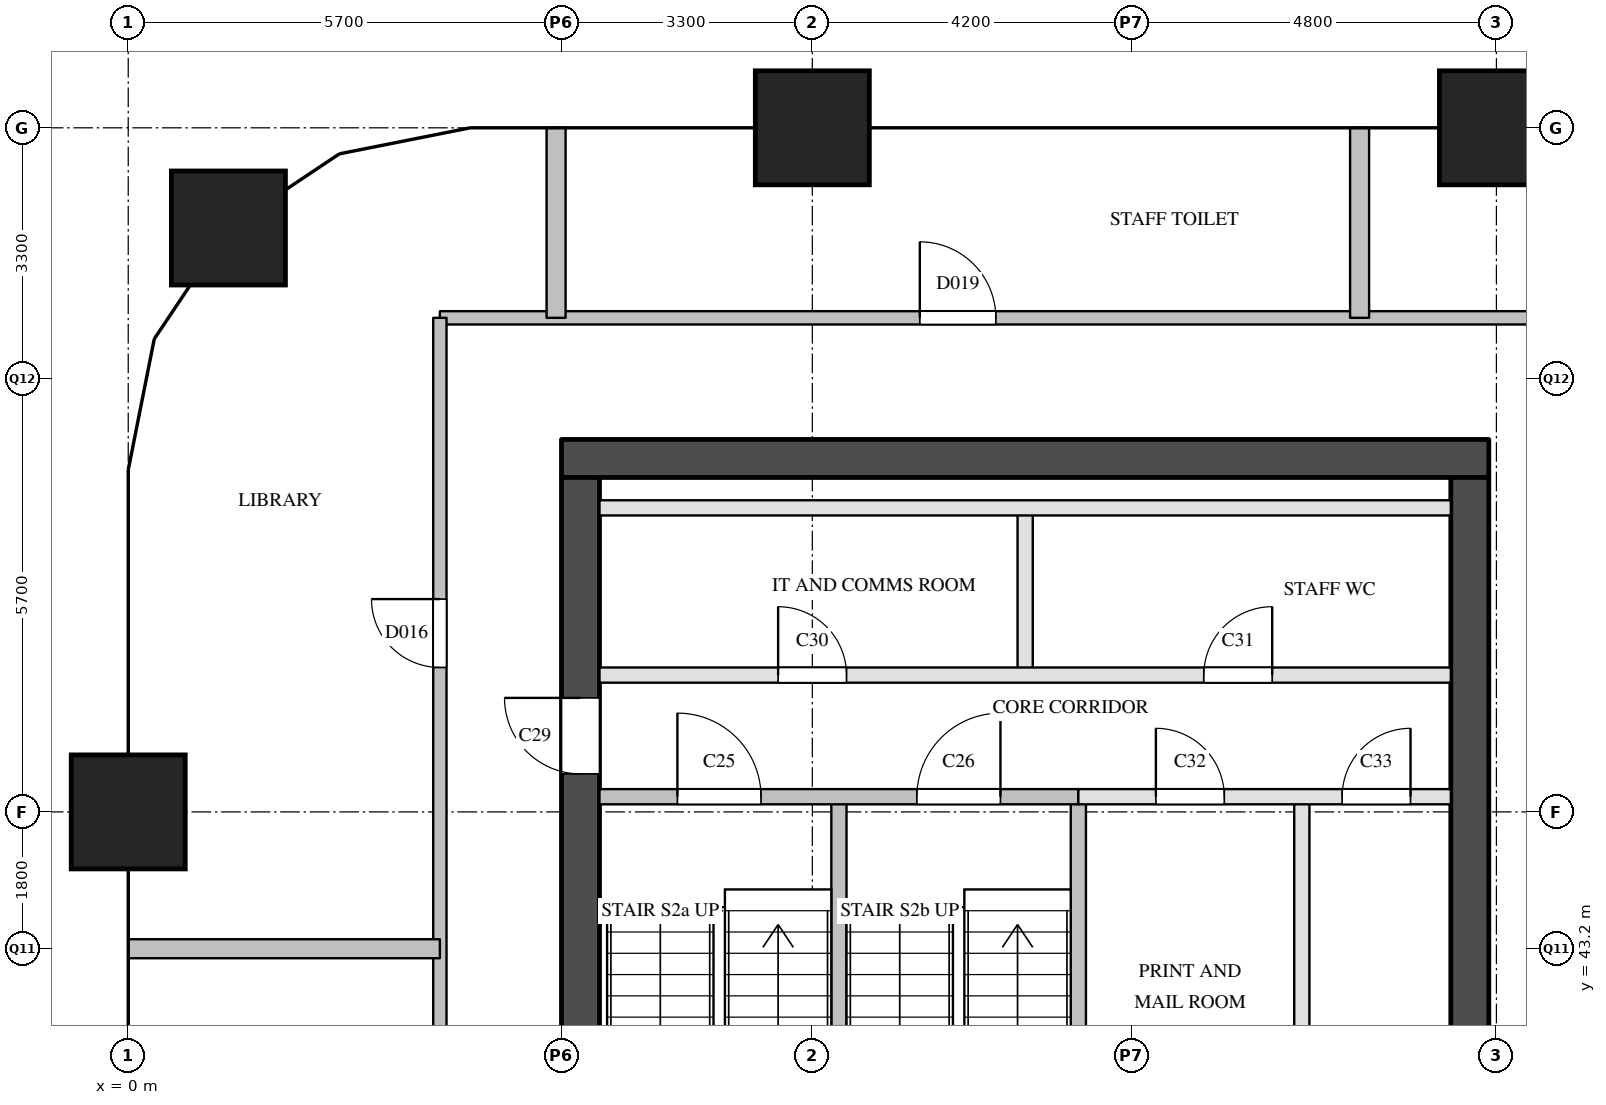
"""IFC4 building model, lengths in metres.
Left out: names, types, materials, properties, quantities, classifications, styles, units other than length and angle.
Written with IfcOpenShell. Run it as: python <this file> out.ifc"""

import sys

from ifc_helpers import new_model, si_unit, direction, frame, frame_2d, origin, origin_2d, place, context, subcontext, project, spatial, rectangle, extrude, element, fill, save


model = new_model("IFC4")
c1 = context("Model", 3, precision=1e-05, world=origin(), true_north=direction((0.0, 1.0)))
c2 = subcontext(c1, "Body", "Model", "MODEL_VIEW")
j1 = project(units=[si_unit("LENGTHUNIT", "METRE"), si_unit("PLANEANGLEUNIT", "RADIAN")], contexts=[c1])
p1 = place(None, origin())
s1 = spatial("IfcSite", under=j1, at=p1, CompositionType="ELEMENT")
p2 = place(p1, origin())
s2 = spatial("IfcBuilding", under=s1, at=p2, CompositionType="ELEMENT")
p3 = place(p2, frame((0.0, 0.0, 162.2)))
s3 = spatial("IfcBuildingStorey", under=s2, at=p3, CompositionType="ELEMENT", Elevation=162.2)
for number, where, z_axis, x_axis in (
    (1, (0.0, 45.0, 0.0), (0.0, 0.0, 1.0), (1.0, 0.0, 0.0)),
    (2, (1.318, 52.682, 0.0), (0.0, 0.0, 1.0), (1.0, 0.0, 0.0)),
    (3, (9.0, 54.0, 0.0), (0.0, 0.0, 1.0), (1.0, 0.0, 0.0)),
    (4, (18.0, 54.0, 0.0), (0.0, 0.0, 1.0), (1.0, 0.0, 0.0)),
):
    element("IfcColumn", number, at=place(p3, frame(where, z_axis=z_axis, x_axis=x_axis)), inside=s3, PredefinedType="COLUMN", context=c2, shape_type="SweptSolid", body=[
        extrude(rectangle(XDim=1.5, YDim=1.5, at=origin_2d()), origin(), (0.0, 0.0, 1.0), 3.9),
    ])
p4 = place(p3, frame((5.7, 49.65, 0.0), z_axis=(0.0, 0.0, 1.0), x_axis=(1.0, 0.0, 0.0)))
e5 = element("IfcWall", 5, at=p4, inside=s3, PredefinedType="SHEAR", context=c2, shape_type="SweptSolid", body=[
    extrude(rectangle(XDim=12.2, YDim=0.5, at=frame_2d((6.1, 0.0))), origin(), (0.0, 0.0, 1.0), 3.6),
])
p5 = place(p3, frame((5.95, 29.1, 0.0), z_axis=(0.0, 0.0, 1.0), x_axis=(0.0, 1.0, 0.0)))
e6 = element("IfcWall", 6, at=p5, inside=s3, PredefinedType="SHEAR", context=c2, shape_type="SweptSolid", body=[
    extrude(rectangle(XDim=20.3, YDim=0.5, at=frame_2d((10.15, 0.0))), origin(), (0.0, 0.0, 1.0), 3.6),
])
p6 = place(p5, frame((3.45, 0.0, 0.0)))
e7 = element("IfcOpeningElement", 7, at=p6, cuts=e6, PredefinedType="OPENING", context=c2, shape_type="SweptSolid", body=[
    extrude(rectangle(XDim=1.0, YDim=2.1, at=frame_2d((0.5, 1.05))), frame((0.0, 0.26, 0.0), z_axis=(0.0, -1.0, 0.0), x_axis=(1.0, 0.0, 0.0)), (0.0, 0.0, 1.0), 0.52),
])
p7 = place(p5, frame((16.4, 0.0, 0.0)))
e8 = element("IfcOpeningElement", 8, at=p7, cuts=e6, PredefinedType="OPENING", context=c2, shape_type="SweptSolid", body=[
    extrude(rectangle(XDim=1.0, YDim=2.1, at=frame_2d((0.5, 1.05))), frame((0.0, 0.26, 0.0), z_axis=(0.0, -1.0, 0.0), x_axis=(1.0, 0.0, 0.0)), (0.0, 0.0, 1.0), 0.52),
])
p8 = place(p3, frame((17.65, 29.1, 0.0), z_axis=(0.0, 0.0, 1.0), x_axis=(0.0, 1.0, 0.0)))
e9 = element("IfcWall", 9, at=p8, inside=s3, PredefinedType="SHEAR", context=c2, shape_type="SweptSolid", body=[
    extrude(rectangle(XDim=20.3, YDim=0.5, at=frame_2d((10.15, 0.0))), origin(), (0.0, 0.0, 1.0), 3.6),
])
p9 = place(p8, frame((1.25, 0.0, 0.0)))
e10 = element("IfcOpeningElement", 10, at=p9, cuts=e9, PredefinedType="OPENING", context=c2, shape_type="SweptSolid", body=[
    extrude(rectangle(XDim=0.7, YDim=2.1, at=frame_2d((0.35, 1.05))), frame((0.0, 0.26, 0.0), z_axis=(0.0, -1.0, 0.0), x_axis=(1.0, 0.0, 0.0)), (0.0, 0.0, 1.0), 0.52),
])
p10 = place(p8, frame((7.05, 0.0, 0.0)))
e11 = element("IfcOpeningElement", 11, at=p10, cuts=e9, PredefinedType="OPENING", context=c2, shape_type="SweptSolid", body=[
    extrude(rectangle(XDim=0.7, YDim=2.1, at=frame_2d((0.35, 1.05))), frame((0.0, 0.26, 0.0), z_axis=(0.0, -1.0, 0.0), x_axis=(1.0, 0.0, 0.0)), (0.0, 0.0, 1.0), 0.52),
])
p11 = place(p8, frame((3.6, 0.0, 0.0)))
e12 = element("IfcOpeningElement", 12, at=p11, cuts=e9, PredefinedType="OPENING", context=c2, shape_type="SweptSolid", body=[
    extrude(rectangle(XDim=1.8, YDim=2.1, at=frame_2d((0.9, 1.05))), frame((0.0, 0.26, 0.0), z_axis=(0.0, -1.0, 0.0), x_axis=(1.0, 0.0, 0.0)), (0.0, 0.0, 1.0), 0.52),
])
p12 = place(p3, frame((9.35, 40.9, 0.0), z_axis=(0.0, 0.0, 1.0), x_axis=(0.0, 1.0, 0.0)))
e13 = element("IfcWall", 13, at=p12, inside=s3, PredefinedType="SOLIDWALL", context=c2, shape_type="SweptSolid", body=[
    extrude(rectangle(XDim=4.3, YDim=0.2, at=frame_2d((2.15, 0.0))), origin(), (0.0, 0.0, 1.0), 3.6),
])
p13 = place(p3, frame((11.8, 46.8, 0.0), z_axis=(0.0, 0.0, 1.0), x_axis=(0.0, 1.0, 0.0)))
e14 = element("IfcWall", 14, at=p13, inside=s3, PredefinedType="PARTITIONING", context=c2, shape_type="SweptSolid", body=[
    extrude(rectangle(XDim=2.2, YDim=0.2, at=frame_2d((1.1, 0.0))), origin(), (0.0, 0.0, 1.0), 3.6),
])
p14 = place(p3, frame((12.5, 40.9, 0.0), z_axis=(0.0, 0.0, 1.0), x_axis=(0.0, 1.0, 0.0)))
e15 = element("IfcWall", 15, at=p14, inside=s3, PredefinedType="SOLIDWALL", context=c2, shape_type="SweptSolid", body=[
    extrude(rectangle(XDim=4.3, YDim=0.2, at=frame_2d((2.15, 0.0))), origin(), (0.0, 0.0, 1.0), 3.6),
])
p15 = place(p3, frame((15.44, 39.0, 0.0), z_axis=(0.0, 0.0, 1.0), x_axis=(0.0, 1.0, 0.0)))
e16 = element("IfcWall", 16, at=p15, inside=s3, PredefinedType="PARTITIONING", context=c2, shape_type="SweptSolid", body=[
    extrude(rectangle(XDim=6.2, YDim=0.2, at=frame_2d((3.1, 0.0))), origin(), (0.0, 0.0, 1.0), 3.6),
])
p16 = place(p3, frame((12.5, 45.2, 0.0), z_axis=(0.0, 0.0, 1.0), x_axis=(1.0, 0.0, 0.0)))
e17 = element("IfcWall", 17, at=p16, inside=s3, PredefinedType="PARTITIONING", context=c2, shape_type="SweptSolid", body=[
    extrude(rectangle(XDim=4.9, YDim=0.2, at=frame_2d((2.45, 0.0))), origin(), (0.0, 0.0, 1.0), 3.6),
])
p17 = place(p16, frame((1.02, 0.0, 0.0)))
e18 = element("IfcOpeningElement", 18, at=p17, cuts=e17, PredefinedType="OPENING", context=c2, shape_type="SweptSolid", body=[
    extrude(rectangle(XDim=0.9, YDim=2.1, at=frame_2d((0.45, 1.05))), frame((0.0, 0.11, 0.0), z_axis=(0.0, -1.0, 0.0), x_axis=(1.0, 0.0, 0.0)), (0.0, 0.0, 1.0), 0.22),
])
p18 = place(p16, frame((3.47, 0.0, 0.0)))
e19 = element("IfcOpeningElement", 19, at=p18, cuts=e17, PredefinedType="OPENING", context=c2, shape_type="SweptSolid", body=[
    extrude(rectangle(XDim=0.9, YDim=2.1, at=frame_2d((0.45, 1.05))), frame((0.0, 0.11, 0.0), z_axis=(0.0, -1.0, 0.0), x_axis=(1.0, 0.0, 0.0)), (0.0, 0.0, 1.0), 0.22),
])
p19 = place(p3, frame((6.2, 45.2, 0.0), z_axis=(0.0, 0.0, 1.0), x_axis=(1.0, 0.0, 0.0)))
e20 = element("IfcWall", 20, at=p19, inside=s3, PredefinedType="SOLIDWALL", context=c2, shape_type="SweptSolid", body=[
    extrude(rectangle(XDim=6.3, YDim=0.2, at=frame_2d((3.15, 0.0))), origin(), (0.0, 0.0, 1.0), 3.6),
])
p20 = place(p19, frame((1.025, 0.0, 0.0)))
e21 = element("IfcOpeningElement", 21, at=p20, cuts=e20, PredefinedType="OPENING", context=c2, shape_type="SweptSolid", body=[
    extrude(rectangle(XDim=1.1, YDim=2.1, at=frame_2d((0.55, 1.05))), frame((0.0, 0.11, 0.0), z_axis=(0.0, -1.0, 0.0), x_axis=(1.0, 0.0, 0.0)), (0.0, 0.0, 1.0), 0.22),
])
p21 = place(p19, frame((4.175, 0.0, 0.0)))
e22 = element("IfcOpeningElement", 22, at=p21, cuts=e20, PredefinedType="OPENING", context=c2, shape_type="SweptSolid", body=[
    extrude(rectangle(XDim=1.1, YDim=2.1, at=frame_2d((0.55, 1.05))), frame((0.0, 0.11, 0.0), z_axis=(0.0, -1.0, 0.0), x_axis=(1.0, 0.0, 0.0)), (0.0, 0.0, 1.0), 0.22),
])
p22 = place(p3, frame((6.2, 46.8, 0.0), z_axis=(0.0, 0.0, 1.0), x_axis=(1.0, 0.0, 0.0)))
e23 = element("IfcWall", 23, at=p22, inside=s3, PredefinedType="PARTITIONING", context=c2, shape_type="SweptSolid", body=[
    extrude(rectangle(XDim=11.2, YDim=0.2, at=frame_2d((5.6, 0.0))), origin(), (0.0, 0.0, 1.0), 3.6),
])
p23 = place(p22, frame((2.35, 0.0, 0.0)))
e24 = element("IfcOpeningElement", 24, at=p23, cuts=e23, PredefinedType="OPENING", context=c2, shape_type="SweptSolid", body=[
    extrude(rectangle(XDim=0.9, YDim=2.1, at=frame_2d((0.45, 1.05))), frame((0.0, 0.11, 0.0), z_axis=(0.0, -1.0, 0.0), x_axis=(1.0, 0.0, 0.0)), (0.0, 0.0, 1.0), 0.22),
])
p24 = place(p22, frame((7.95, 0.0, 0.0)))
e25 = element("IfcOpeningElement", 25, at=p24, cuts=e23, PredefinedType="OPENING", context=c2, shape_type="SweptSolid", body=[
    extrude(rectangle(XDim=0.9, YDim=2.1, at=frame_2d((0.45, 1.05))), frame((0.0, 0.11, 0.0), z_axis=(0.0, -1.0, 0.0), x_axis=(1.0, 0.0, 0.0)), (0.0, 0.0, 1.0), 0.22),
])
p25 = place(p3, frame((6.2, 49.0, 0.0), z_axis=(0.0, 0.0, 1.0), x_axis=(1.0, 0.0, 0.0)))
e26 = element("IfcWall", 26, at=p25, inside=s3, PredefinedType="PARTITIONING", context=c2, shape_type="SweptSolid", body=[
    extrude(rectangle(XDim=11.2, YDim=0.2, at=frame_2d((5.6, 0.0))), origin(), (0.0, 0.0, 1.0), 3.6),
])
p26 = place(p3, frame((4.1, 51.5, 0.0), z_axis=(0.0, 0.0, 1.0), x_axis=(1.0, 0.0, 0.0)))
e27 = element("IfcWall", 27, at=p26, inside=s3, PredefinedType="PARTITIONING", context=c2, shape_type="SweptSolid", body=[
    extrude(rectangle(XDim=15.4, YDim=0.175, at=frame_2d((7.7, 0.0))), origin(), (0.0, 0.0, 1.0), 3.6),
])
p27 = place(p26, frame((6.314, 0.0, 0.0)))
e28 = element("IfcOpeningElement", 28, at=p27, cuts=e27, PredefinedType="OPENING", context=c2, shape_type="SweptSolid", body=[
    extrude(rectangle(XDim=1.0, YDim=2.1, at=frame_2d((0.5, 1.05))), frame((0.0, 0.097, 0.0), z_axis=(0.0, -1.0, 0.0), x_axis=(1.0, 0.0, 0.0)), (0.0, 0.0, 1.0), 0.195),
])
p28 = place(p3, frame((4.1, 28.5, 0.0), z_axis=(0.0, 0.0, 1.0), x_axis=(0.0, 1.0, 0.0)))
e29 = element("IfcWall", 29, at=p28, inside=s3, PredefinedType="PARTITIONING", context=c2, shape_type="SweptSolid", body=[
    extrude(rectangle(XDim=23.0, YDim=0.175, at=frame_2d((11.5, 0.0))), origin(), (0.0, 0.0, 1.0), 3.6),
])
p29 = place(p28, frame((6.9, 0.0, 0.0)))
e30 = element("IfcOpeningElement", 30, at=p29, cuts=e29, PredefinedType="OPENING", context=c2, shape_type="SweptSolid", body=[
    extrude(rectangle(XDim=0.9, YDim=2.1, at=frame_2d((0.45, 1.05))), frame((0.0, 0.097, 0.0), z_axis=(0.0, -1.0, 0.0), x_axis=(1.0, 0.0, 0.0)), (0.0, 0.0, 1.0), 0.195),
])
p30 = place(p28, frame((18.4, 0.0, 0.0)))
e31 = element("IfcOpeningElement", 31, at=p30, cuts=e29, PredefinedType="OPENING", context=c2, shape_type="SweptSolid", body=[
    extrude(rectangle(XDim=0.9, YDim=2.1, at=frame_2d((0.45, 1.05))), frame((0.0, 0.097, 0.0), z_axis=(0.0, -1.0, 0.0), x_axis=(1.0, 0.0, 0.0)), (0.0, 0.0, 1.0), 0.195),
])
p31 = place(p3, frame((0.0, 43.2, 0.0), z_axis=(0.0, 0.0, 1.0), x_axis=(1.0, 0.0, 0.0)))
e32 = element("IfcWall", 32, at=p31, inside=s3, PredefinedType="PARTITIONING", context=c2, shape_type="SweptSolid", body=[
    extrude(rectangle(XDim=4.1, YDim=0.25, at=frame_2d((2.05, 0.0))), origin(), (0.0, 0.0, 1.0), 2.6),
])
for number, where, z_axis, x_axis in (
    (33, (5.629, 51.5, 0.0), (0.0, 0.0, 1.0), (0.0, 1.0, 0.0)),
    (34, (16.2, 51.5, 0.0), (0.0, 0.0, 1.0), (0.0, 1.0, 0.0)),
):
    element("IfcWall", number, at=place(p3, frame(where, z_axis=z_axis, x_axis=x_axis)), inside=s3, PredefinedType="PARTITIONING", context=c2, shape_type="SweptSolid", body=[
        extrude(rectangle(XDim=2.5, YDim=0.25, at=frame_2d((1.25, 0.0))), origin(), (0.0, 0.0, 1.0), 2.6),
    ])
p32 = place(p20, origin())
e35 = element("IfcDoor", 35, at=p32, inside=s3, OperationType="SINGLE_SWING_LEFT", PredefinedType="DOOR", context=c2, shape_type="SweptSolid", body=[
    extrude(rectangle(XDim=1.1, YDim=2.1, at=frame_2d((0.55, 1.05))), frame((0.0, 0.025, 0.0), z_axis=(0.0, -1.0, 0.0), x_axis=(1.0, 0.0, 0.0)), (0.0, 0.0, 1.0), 0.05),
])
fill(e21, e35)
p33 = place(p21, origin())
e36 = element("IfcDoor", 36, at=p33, inside=s3, OperationType="SINGLE_SWING_RIGHT", PredefinedType="DOOR", context=c2, shape_type="SweptSolid", body=[
    extrude(rectangle(XDim=1.1, YDim=2.1, at=frame_2d((0.55, 1.05))), frame((0.0, 0.025, 0.0), z_axis=(0.0, -1.0, 0.0), x_axis=(1.0, 0.0, 0.0)), (0.0, 0.0, 1.0), 0.05),
])
fill(e22, e36)
p34 = place(p7, origin())
e37 = element("IfcDoor", 37, at=p34, inside=s3, OperationType="SINGLE_SWING_RIGHT", PredefinedType="DOOR", context=c2, shape_type="SweptSolid", body=[
    extrude(rectangle(XDim=1.0, YDim=2.1, at=frame_2d((0.5, 1.05))), frame((0.0, 0.025, 0.0), z_axis=(0.0, -1.0, 0.0), x_axis=(1.0, 0.0, 0.0)), (0.0, 0.0, 1.0), 0.05),
])
fill(e8, e37)
p35 = place(p23, origin())
e38 = element("IfcDoor", 38, at=p35, inside=s3, OperationType="SINGLE_SWING_LEFT", PredefinedType="DOOR", context=c2, shape_type="SweptSolid", body=[
    extrude(rectangle(XDim=0.9, YDim=2.1, at=frame_2d((0.45, 1.05))), frame((0.0, 0.025, 0.0), z_axis=(0.0, -1.0, 0.0), x_axis=(1.0, 0.0, 0.0)), (0.0, 0.0, 1.0), 0.05),
])
fill(e24, e38)
p36 = place(p24, origin())
e39 = element("IfcDoor", 39, at=p36, inside=s3, OperationType="SINGLE_SWING_RIGHT", PredefinedType="DOOR", context=c2, shape_type="SweptSolid", body=[
    extrude(rectangle(XDim=0.9, YDim=2.1, at=frame_2d((0.45, 1.05))), frame((0.0, 0.025, 0.0), z_axis=(0.0, -1.0, 0.0), x_axis=(1.0, 0.0, 0.0)), (0.0, 0.0, 1.0), 0.05),
])
fill(e25, e39)
p37 = place(p17, origin())
e40 = element("IfcDoor", 40, at=p37, inside=s3, OperationType="SINGLE_SWING_LEFT", PredefinedType="DOOR", context=c2, shape_type="SweptSolid", body=[
    extrude(rectangle(XDim=0.9, YDim=2.1, at=frame_2d((0.45, 1.05))), frame((0.0, 0.025, 0.0), z_axis=(0.0, -1.0, 0.0), x_axis=(1.0, 0.0, 0.0)), (0.0, 0.0, 1.0), 0.05),
])
fill(e18, e40)
p38 = place(p18, origin())
e41 = element("IfcDoor", 41, at=p38, inside=s3, OperationType="SINGLE_SWING_RIGHT", PredefinedType="DOOR", context=c2, shape_type="SweptSolid", body=[
    extrude(rectangle(XDim=0.9, YDim=2.1, at=frame_2d((0.45, 1.05))), frame((0.0, 0.025, 0.0), z_axis=(0.0, -1.0, 0.0), x_axis=(1.0, 0.0, 0.0)), (0.0, 0.0, 1.0), 0.05),
])
fill(e19, e41)
p39 = place(p30, origin())
e42 = element("IfcDoor", 42, at=p39, inside=s3, OperationType="SINGLE_SWING_RIGHT", PredefinedType="DOOR", context=c2, shape_type="SweptSolid", body=[
    extrude(rectangle(XDim=0.9, YDim=2.1, at=frame_2d((0.45, 1.05))), frame((0.0, 0.025, 0.0), z_axis=(0.0, -1.0, 0.0), x_axis=(1.0, 0.0, 0.0)), (0.0, 0.0, 1.0), 0.05),
])
fill(e31, e42)
p40 = place(p27, origin())
e43 = element("IfcDoor", 43, at=p40, inside=s3, OperationType="SINGLE_SWING_LEFT", PredefinedType="DOOR", context=c2, shape_type="SweptSolid", body=[
    extrude(rectangle(XDim=1.0, YDim=2.1, at=frame_2d((0.5, 1.05))), frame((0.0, 0.025, 0.0), z_axis=(0.0, -1.0, 0.0), x_axis=(1.0, 0.0, 0.0)), (0.0, 0.0, 1.0), 0.05),
])
fill(e28, e43)
save(model, sys.argv[1])
